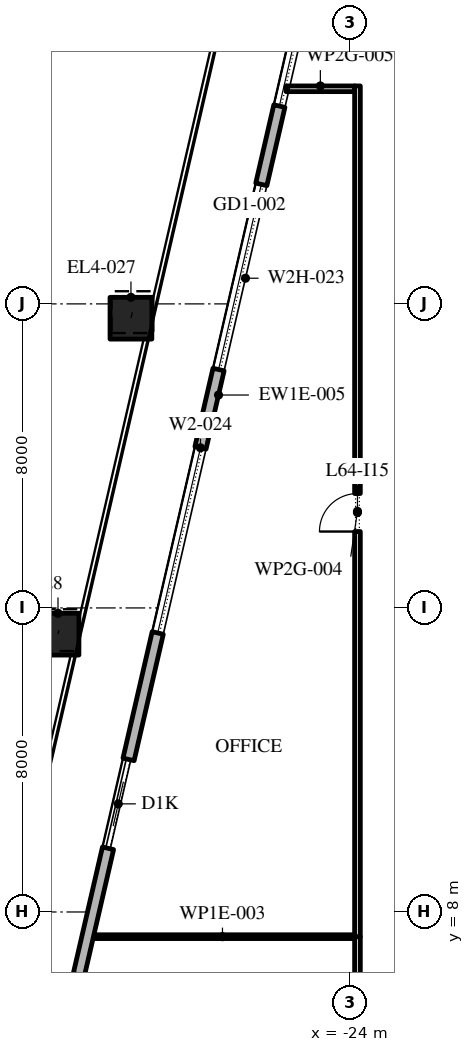
"""IFC4 building model, lengths in metres.
Left out: names, types, materials, properties, quantities, classifications, styles, units other than length and angle.
Written with IfcOpenShell. Run it as: python <this file> out.ifc"""

import sys

from ifc_helpers import new_model, si_unit, direction, frame, frame_2d, origin, origin_2d, place, context, subcontext, project, spatial, rectangle, extrude, element, fill, save


model = new_model("IFC4")
c1 = context("Model", 3, precision=1e-05, world=origin(), true_north=direction((0.0, 1.0)))
c2 = subcontext(c1, "Body", "Model", "MODEL_VIEW")
j1 = project(units=[si_unit("LENGTHUNIT", "METRE"), si_unit("PLANEANGLEUNIT", "RADIAN")], contexts=[c1])
p1 = place(None, origin())
s1 = spatial("IfcSite", under=j1, at=p1, CompositionType="ELEMENT")
p2 = place(p1, origin())
s2 = spatial("IfcBuilding", under=s1, at=p2, CompositionType="ELEMENT")
p3 = place(p2, frame((0.0, 0.0, 293.4)))
s3 = spatial("IfcBuildingStorey", under=s2, at=p3, CompositionType="ELEMENT", Elevation=293.4)
p4 = place(p3, frame((-29.76, 23.623, 0.0), z_axis=(0.008770375651, 0.037927518544, 0.999242004646), x_axis=(-0.974290512438, 0.225295355862, 0.0)))
e1 = element("IfcColumn", 1, at=p4, inside=s3, PredefinedType="COLUMN", context=c2, shape_type="SweptSolid", body=[
    extrude(rectangle(XDim=1.1, YDim=1.1, at=origin_2d()), origin(), (0.0, 0.0, 1.0), 4.203),
])
p5 = place(p3, frame((-31.68, 15.31, 0.0), z_axis=(0.005868750925, 0.02527630349, 0.999663276431), x_axis=(-0.974088391429, 0.226167649504, 0.0)))
e2 = element("IfcColumn", 2, at=p5, inside=s3, PredefinedType="COLUMN", context=c2, shape_type="SweptSolid", body=[
    extrude(rectangle(XDim=1.1, YDim=1.1, at=origin_2d()), origin(), (0.0, 0.0, 1.0), 4.202),
])
p6 = place(p3, frame((-23.8, -4.475, 0.0), z_axis=(0.0, 0.0, 1.0), x_axis=(0.0, 1.0, 0.0)))
e3 = element("IfcWall", 3, at=p6, inside=s3, PredefinedType="PARTITIONING", context=c2, shape_type="SweptSolid", body=[
    extrude(rectangle(XDim=11.825, YDim=0.15, at=frame_2d((5.913, 0.0))), origin(), (0.0, 0.0, 1.0), 3.75),
])
p7 = place(p3, frame((-23.875, 7.35, 0.0), z_axis=(0.0, 0.0, 1.0), x_axis=(-1.0, 0.0, 0.0)))
e4 = element("IfcWall", 4, at=p7, inside=s3, PredefinedType="PARTITIONING", context=c2, shape_type="SweptSolid", body=[
    extrude(rectangle(XDim=6.954, YDim=0.1, at=frame_2d((3.477, 0.0))), origin(), (0.0, 0.0, 1.0), 3.75),
])
p8 = place(p3, frame((-23.8, 7.35, 0.0), z_axis=(0.0, 0.0, 1.0), x_axis=(0.0, 1.0, 0.0)))
e5 = element("IfcWall", 5, at=p8, inside=s3, PredefinedType="PARTITIONING", context=c2, shape_type="SweptSolid", body=[
    extrude(rectangle(XDim=22.385, YDim=0.15, at=frame_2d((11.192, 0.0))), origin(), (0.0, 0.0, 1.0), 3.75),
])
p9 = place(p8, frame((10.66, 0.0, 0.0)))
e6 = element("IfcOpeningElement", 6, at=p9, cuts=e5, PredefinedType="OPENING", context=c2, shape_type="SweptSolid", body=[
    extrude(rectangle(XDim=1.0, YDim=2.1, at=frame_2d((0.5, 1.05))), frame((0.0, 0.085, 0.0), z_axis=(0.0, -1.0, 0.0), x_axis=(1.0, 0.0, 0.0)), (0.0, 0.0, 1.0), 0.17),
])
p10 = place(p3, frame((-23.875, 29.66, 0.0), z_axis=(0.0, 0.0, 1.0), x_axis=(-1.0, 0.0, 0.0)))
e7 = element("IfcWall", 7, at=p10, inside=s3, PredefinedType="PARTITIONING", context=c2, shape_type="SweptSolid", body=[
    extrude(rectangle(XDim=1.803, YDim=0.15, at=frame_2d((0.901, 0.0))), origin(), (0.0, 0.0, 1.0), 3.75),
])
p11 = place(p3, frame((-22.71, 42.825, 0.0), z_axis=(0.0, 0.0, 1.0), x_axis=(-0.224948057419, -0.974370756675, 0.0)))
e8 = element("IfcWall", 8, at=p11, inside=s3, PredefinedType="STANDARD", context=c2, shape_type="SweptSolid", body=[
    extrude(rectangle(XDim=43.493, YDim=0.3, at=frame_2d((21.747, 0.0))), origin(), (0.0, 0.0, 1.0), 3.75),
])
p12 = place(p11, frame((3.164, 0.0, 0.0)))
e9 = element("IfcOpeningElement", 9, at=p12, cuts=e8, PredefinedType="OPENING", context=c2, shape_type="SweptSolid", body=[
    extrude(rectangle(XDim=2.4, YDim=3.5, at=frame_2d((1.2, 1.75))), frame((0.0, 0.16, 0.0), z_axis=(0.0, -1.0, 0.0), x_axis=(1.0, 0.0, 0.0)), (0.0, 0.0, 1.0), 0.32),
])
p13 = place(p11, frame((8.979, 0.0, 0.45)))
e10 = element("IfcOpeningElement", 10, at=p13, cuts=e8, PredefinedType="OPENING", context=c2, shape_type="SweptSolid", body=[
    extrude(rectangle(XDim=5.0, YDim=3.25, at=frame_2d((2.5, 1.625))), frame((0.0, 0.16, 0.0), z_axis=(0.0, -1.0, 0.0), x_axis=(1.0, 0.0, 0.0)), (0.0, 0.0, 1.0), 0.32),
])
p14 = place(p11, frame((16.093, 0.0, 0.45)))
e11 = element("IfcOpeningElement", 11, at=p14, cuts=e8, PredefinedType="OPENING", context=c2, shape_type="SweptSolid", body=[
    extrude(rectangle(XDim=5.0, YDim=2.7, at=frame_2d((2.5, 1.35))), frame((0.0, 0.16, 0.0), z_axis=(0.0, -1.0, 0.0), x_axis=(1.0, 0.0, 0.0)), (0.0, 0.0, 1.0), 0.32),
])
p15 = place(p11, frame((23.207, 0.0, 0.45)))
e12 = element("IfcOpeningElement", 12, at=p15, cuts=e8, PredefinedType="OPENING", context=c2, shape_type="SweptSolid", body=[
    extrude(rectangle(XDim=5.0, YDim=3.25, at=frame_2d((2.5, 1.625))), frame((0.0, 0.16, 0.0), z_axis=(0.0, -1.0, 0.0), x_axis=(1.0, 0.0, 0.0)), (0.0, 0.0, 1.0), 0.32),
])
p16 = place(p11, frame((31.621, 0.0, 0.0)))
e13 = element("IfcOpeningElement", 13, at=p16, cuts=e8, PredefinedType="OPENING", context=c2, shape_type="SweptSolid", body=[
    extrude(rectangle(XDim=2.4, YDim=3.075, at=frame_2d((1.2, 1.538))), frame((0.0, 0.16, 0.0), z_axis=(0.0, -1.0, 0.0), x_axis=(1.0, 0.0, 0.0)), (0.0, 0.0, 1.0), 0.32),
])
p17 = place(p11, frame((37.436, 0.0, 0.45)))
e14 = element("IfcOpeningElement", 14, at=p17, cuts=e8, PredefinedType="OPENING", context=c2, shape_type="SweptSolid", body=[
    extrude(rectangle(XDim=5.0, YDim=2.575, at=frame_2d((2.5, 1.288))), frame((0.0, 0.16, 0.0), z_axis=(0.0, -1.0, 0.0), x_axis=(1.0, 0.0, 0.0)), (0.0, 0.0, 1.0), 0.32),
])
p18 = place(p13, origin())
e15 = element("IfcWindow", 15, at=p18, inside=s3, PartitioningType="DOUBLE_PANEL_VERTICAL", PredefinedType="WINDOW", context=c2, shape_type="SweptSolid", body=[
    extrude(rectangle(XDim=5.0, YDim=3.25, at=frame_2d((2.5, 1.625))), frame((0.0, 0.03, 0.0), z_axis=(0.0, -1.0, 0.0), x_axis=(1.0, 0.0, 0.0)), (0.0, 0.0, 1.0), 0.06),
])
fill(e10, e15)
p19 = place(p14, origin())
e16 = element("IfcWindow", 16, at=p19, inside=s3, PartitioningType="DOUBLE_PANEL_VERTICAL", PredefinedType="WINDOW", context=c2, shape_type="SweptSolid", body=[
    extrude(rectangle(XDim=5.0, YDim=2.7, at=frame_2d((2.5, 1.35))), frame((0.0, 0.03, 0.0), z_axis=(0.0, -1.0, 0.0), x_axis=(1.0, 0.0, 0.0)), (0.0, 0.0, 1.0), 0.06),
])
fill(e11, e16)
p20 = place(p15, origin())
e17 = element("IfcWindow", 17, at=p20, inside=s3, PartitioningType="DOUBLE_PANEL_VERTICAL", PredefinedType="WINDOW", context=c2, shape_type="SweptSolid", body=[
    extrude(rectangle(XDim=5.0, YDim=3.25, at=frame_2d((2.5, 1.625))), frame((0.0, 0.03, 0.0), z_axis=(0.0, -1.0, 0.0), x_axis=(1.0, 0.0, 0.0)), (0.0, 0.0, 1.0), 0.06),
])
fill(e12, e17)
p21 = place(p16, origin())
e18 = element("IfcDoor", 18, at=p21, inside=s3, OperationType="DOUBLE_DOOR_SLIDING", PredefinedType="DOOR", context=c2, shape_type="SweptSolid", body=[
    extrude(rectangle(XDim=2.4, YDim=3.075, at=frame_2d((1.2, 1.538))), frame((0.0, 0.025, 0.0), z_axis=(0.0, -1.0, 0.0), x_axis=(1.0, 0.0, 0.0)), (0.0, 0.0, 1.0), 0.05),
])
fill(e13, e18)
p22 = place(p9, origin())
e19 = element("IfcDoor", 19, at=p22, inside=s3, OperationType="SINGLE_SWING_RIGHT", PredefinedType="DOOR", context=c2, shape_type="SweptSolid", body=[
    extrude(rectangle(XDim=1.0, YDim=2.1, at=frame_2d((0.5, 1.05))), frame((0.0, 0.025, 0.0), z_axis=(0.0, -1.0, 0.0), x_axis=(1.0, 0.0, 0.0)), (0.0, 0.0, 1.0), 0.05),
])
fill(e6, e19)
save(model, sys.argv[1])
